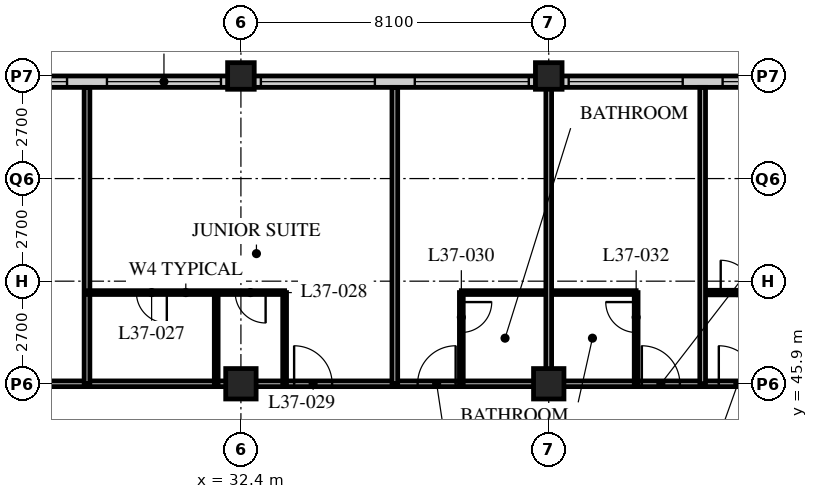
"""IFC4 building model, lengths in metres.
Left out: names, types, materials, properties, quantities, classifications, styles, units other than length and angle.
Written with IfcOpenShell. Run it as: python <this file> out.ifc"""

import sys

from ifc_helpers import new_model, si_unit, direction, frame, frame_2d, origin, origin_2d, place, context, subcontext, project, spatial, rectangle, hollow_rectangle, extrude, element, fill, save


model = new_model("IFC4")
c1 = context("Model", 3, precision=1e-05, world=origin(), true_north=direction((0.0, 1.0)))
c2 = subcontext(c1, "Body", "Model", "MODEL_VIEW")
j1 = project(units=[si_unit("LENGTHUNIT", "METRE"), si_unit("PLANEANGLEUNIT", "RADIAN")], contexts=[c1])
p1 = place(None, origin())
s1 = spatial("IfcSite", under=j1, at=p1, CompositionType="ELEMENT")
p2 = place(p1, origin())
s2 = spatial("IfcBuilding", under=s1, at=p2, CompositionType="ELEMENT")
p3 = place(p2, frame((0.0, 0.0, 144.2)))
s3 = spatial("IfcBuildingStorey", under=s2, at=p3, CompositionType="ELEMENT", Elevation=144.2)
p4 = place(p3, frame((32.4, 45.9, 0.0), z_axis=(0.0, 0.0, 1.0), x_axis=(1.0, 0.0, 0.0)))
e1 = element("IfcColumn", 1, at=p4, inside=s3, PredefinedType="COLUMN", context=c2, shape_type="SweptSolid", body=[
    extrude(hollow_rectangle(XDim=0.8, YDim=0.8, WallThickness=0.08, at=origin_2d()), origin(), (0.0, 0.0, 1.0), 3.4),
])
p5 = place(p3, frame((32.4, 54.0, 0.0), z_axis=(0.0, 0.0, 1.0), x_axis=(1.0, 0.0, 0.0)))
e2 = element("IfcColumn", 2, at=p5, inside=s3, PredefinedType="COLUMN", context=c2, shape_type="SweptSolid", body=[
    extrude(hollow_rectangle(XDim=0.7, YDim=0.7, WallThickness=0.07, at=origin_2d()), origin(), (0.0, 0.0, 1.0), 3.4),
])
p6 = place(p3, frame((40.5, 45.9, 0.0), z_axis=(0.0, 0.0, 1.0), x_axis=(1.0, 0.0, 0.0)))
e3 = element("IfcColumn", 3, at=p6, inside=s3, PredefinedType="COLUMN", context=c2, shape_type="SweptSolid", body=[
    extrude(hollow_rectangle(XDim=0.8, YDim=0.8, WallThickness=0.08, at=origin_2d()), origin(), (0.0, 0.0, 1.0), 3.4),
])
p7 = place(p3, frame((40.5, 54.0, 0.0), z_axis=(0.0, 0.0, 1.0), x_axis=(1.0, 0.0, 0.0)))
e4 = element("IfcColumn", 4, at=p7, inside=s3, PredefinedType="COLUMN", context=c2, shape_type="SweptSolid", body=[
    extrude(hollow_rectangle(XDim=0.7, YDim=0.7, WallThickness=0.07, at=origin_2d()), origin(), (0.0, 0.0, 1.0), 3.4),
])
p8 = place(p3, frame((48.3, 53.85, 0.0), z_axis=(0.0, 0.0, 1.0), x_axis=(-1.0, 0.0, 0.0)))
e5 = element("IfcWall", 5, at=p8, inside=s3, PredefinedType="SOLIDWALL", context=c2, shape_type="SweptSolid", body=[
    extrude(rectangle(XDim=40.2, YDim=0.3, at=frame_2d((20.1, 0.0))), origin(), (0.0, 0.0, 1.0), 3.19),
])
p9 = place(p8, frame((0.225, 0.0, 0.9)))
e6 = element("IfcOpeningElement", 6, at=p9, cuts=e5, PredefinedType="OPENING", context=c2, shape_type="SweptSolid", body=[
    extrude(rectangle(XDim=3.0, YDim=1.4, at=frame_2d((1.5, 0.7))), frame((0.0, 0.16, 0.0), z_axis=(0.0, -1.0, 0.0), x_axis=(1.0, 0.0, 0.0)), (0.0, 0.0, 1.0), 0.32),
])
p10 = place(p8, frame((4.275, 0.0, 0.9)))
e7 = element("IfcOpeningElement", 7, at=p10, cuts=e5, PredefinedType="OPENING", context=c2, shape_type="SweptSolid", body=[
    extrude(rectangle(XDim=3.0, YDim=1.4, at=frame_2d((1.5, 0.7))), frame((0.0, 0.16, 0.0), z_axis=(0.0, -1.0, 0.0), x_axis=(1.0, 0.0, 0.0)), (0.0, 0.0, 1.0), 0.32),
])
p11 = place(p8, frame((8.325, 0.0, 0.9)))
e8 = element("IfcOpeningElement", 8, at=p11, cuts=e5, PredefinedType="OPENING", context=c2, shape_type="SweptSolid", body=[
    extrude(rectangle(XDim=3.0, YDim=1.4, at=frame_2d((1.5, 0.7))), frame((0.0, 0.16, 0.0), z_axis=(0.0, -1.0, 0.0), x_axis=(1.0, 0.0, 0.0)), (0.0, 0.0, 1.0), 0.32),
])
p12 = place(p8, frame((12.375, 0.0, 0.9)))
e9 = element("IfcOpeningElement", 9, at=p12, cuts=e5, PredefinedType="OPENING", context=c2, shape_type="SweptSolid", body=[
    extrude(rectangle(XDim=3.0, YDim=1.4, at=frame_2d((1.5, 0.7))), frame((0.0, 0.16, 0.0), z_axis=(0.0, -1.0, 0.0), x_axis=(1.0, 0.0, 0.0)), (0.0, 0.0, 1.0), 0.32),
])
p13 = place(p8, frame((16.425, 0.0, 0.9)))
e10 = element("IfcOpeningElement", 10, at=p13, cuts=e5, PredefinedType="OPENING", context=c2, shape_type="SweptSolid", body=[
    extrude(rectangle(XDim=3.0, YDim=1.4, at=frame_2d((1.5, 0.7))), frame((0.0, 0.16, 0.0), z_axis=(0.0, -1.0, 0.0), x_axis=(1.0, 0.0, 0.0)), (0.0, 0.0, 1.0), 0.32),
])
p14 = place(p8, frame((20.475, 0.0, 0.9)))
e11 = element("IfcOpeningElement", 11, at=p14, cuts=e5, PredefinedType="OPENING", context=c2, shape_type="SweptSolid", body=[
    extrude(rectangle(XDim=3.0, YDim=1.4, at=frame_2d((1.5, 0.7))), frame((0.0, 0.16, 0.0), z_axis=(0.0, -1.0, 0.0), x_axis=(1.0, 0.0, 0.0)), (0.0, 0.0, 1.0), 0.32),
])
p15 = place(p8, frame((24.525, 0.0, 0.9)))
e12 = element("IfcOpeningElement", 12, at=p15, cuts=e5, PredefinedType="OPENING", context=c2, shape_type="SweptSolid", body=[
    extrude(rectangle(XDim=3.0, YDim=1.4, at=frame_2d((1.5, 0.7))), frame((0.0, 0.16, 0.0), z_axis=(0.0, -1.0, 0.0), x_axis=(1.0, 0.0, 0.0)), (0.0, 0.0, 1.0), 0.32),
])
p16 = place(p8, frame((28.575, 0.0, 0.9)))
e13 = element("IfcOpeningElement", 13, at=p16, cuts=e5, PredefinedType="OPENING", context=c2, shape_type="SweptSolid", body=[
    extrude(rectangle(XDim=3.0, YDim=1.4, at=frame_2d((1.5, 0.7))), frame((0.0, 0.16, 0.0), z_axis=(0.0, -1.0, 0.0), x_axis=(1.0, 0.0, 0.0)), (0.0, 0.0, 1.0), 0.32),
])
p17 = place(p8, frame((32.625, 0.0, 0.9)))
e14 = element("IfcOpeningElement", 14, at=p17, cuts=e5, PredefinedType="OPENING", context=c2, shape_type="SweptSolid", body=[
    extrude(rectangle(XDim=3.0, YDim=1.4, at=frame_2d((1.5, 0.7))), frame((0.0, 0.16, 0.0), z_axis=(0.0, -1.0, 0.0), x_axis=(1.0, 0.0, 0.0)), (0.0, 0.0, 1.0), 0.32),
])
p18 = place(p8, frame((36.675, 0.0, 0.9)))
e15 = element("IfcOpeningElement", 15, at=p18, cuts=e5, PredefinedType="OPENING", context=c2, shape_type="SweptSolid", body=[
    extrude(rectangle(XDim=3.0, YDim=1.4, at=frame_2d((1.5, 0.7))), frame((0.0, 0.16, 0.0), z_axis=(0.0, -1.0, 0.0), x_axis=(1.0, 0.0, 0.0)), (0.0, 0.0, 1.0), 0.32),
])
p19 = place(p3, frame((12.15, 45.9, 0.0), z_axis=(0.0, 0.0, 1.0), x_axis=(1.0, 0.0, 0.0)))
e16 = element("IfcWall", 16, at=p19, inside=s3, PredefinedType="PARTITIONING", context=c2, shape_type="SweptSolid", body=[
    extrude(rectangle(XDim=36.45, YDim=0.15, at=frame_2d((18.225, 0.0))), origin(), (0.0, 0.0, 1.0), 2.42),
])
p20 = place(p19, frame((9.225, 0.0, 0.0)))
e17 = element("IfcOpeningElement", 17, at=p20, cuts=e16, PredefinedType="OPENING", context=c2, shape_type="SweptSolid", body=[
    extrude(rectangle(XDim=1.8, YDim=2.4, at=frame_2d((0.9, 1.2))), frame((0.0, 0.085, 0.0), z_axis=(0.0, -1.0, 0.0), x_axis=(1.0, 0.0, 0.0)), (0.0, 0.0, 1.0), 0.17),
])
p21 = place(p19, frame((21.65, 0.0, 0.0)))
e18 = element("IfcOpeningElement", 18, at=p21, cuts=e16, PredefinedType="OPENING", context=c2, shape_type="SweptSolid", body=[
    extrude(rectangle(XDim=1.0, YDim=2.1, at=frame_2d((0.5, 1.05))), frame((0.0, 0.085, 0.0), z_axis=(0.0, -1.0, 0.0), x_axis=(1.0, 0.0, 0.0)), (0.0, 0.0, 1.0), 0.17),
])
p22 = place(p19, frame((24.9, 0.0, 0.0)))
e19 = element("IfcOpeningElement", 19, at=p22, cuts=e16, PredefinedType="OPENING", context=c2, shape_type="SweptSolid", body=[
    extrude(rectangle(XDim=1.0, YDim=2.1, at=frame_2d((0.5, 1.05))), frame((0.0, 0.085, 0.0), z_axis=(0.0, -1.0, 0.0), x_axis=(1.0, 0.0, 0.0)), (0.0, 0.0, 1.0), 0.17),
])
p23 = place(p19, frame((30.8, 0.0, 0.0)))
e20 = element("IfcOpeningElement", 20, at=p23, cuts=e16, PredefinedType="OPENING", context=c2, shape_type="SweptSolid", body=[
    extrude(rectangle(XDim=1.0, YDim=2.1, at=frame_2d((0.5, 1.05))), frame((0.0, 0.085, 0.0), z_axis=(0.0, -1.0, 0.0), x_axis=(1.0, 0.0, 0.0)), (0.0, 0.0, 1.0), 0.17),
])
p24 = place(p19, frame((32.825, 0.0, 0.0)))
e21 = element("IfcOpeningElement", 21, at=p24, cuts=e16, PredefinedType="OPENING", context=c2, shape_type="SweptSolid", body=[
    extrude(rectangle(XDim=1.0, YDim=2.1, at=frame_2d((0.5, 1.05))), frame((0.0, 0.085, 0.0), z_axis=(0.0, -1.0, 0.0), x_axis=(1.0, 0.0, 0.0)), (0.0, 0.0, 1.0), 0.17),
])
p25 = place(p19, frame((1.525, 0.0, 0.0)))
e22 = element("IfcOpeningElement", 22, at=p25, cuts=e16, PredefinedType="OPENING", context=c2, shape_type="SweptSolid", body=[
    extrude(rectangle(XDim=1.0, YDim=2.1, at=frame_2d((0.5, 1.05))), frame((0.0, 0.085, 0.0), z_axis=(0.0, -1.0, 0.0), x_axis=(1.0, 0.0, 0.0)), (0.0, 0.0, 1.0), 0.17),
])
p26 = place(p3, frame((28.35, 45.9, 0.0), z_axis=(0.0, 0.0, 1.0), x_axis=(0.0, 1.0, 0.0)))
e23 = element("IfcWall", 23, at=p26, inside=s3, PredefinedType="PARTITIONING", context=c2, shape_type="SweptSolid", body=[
    extrude(rectangle(XDim=7.8, YDim=0.15, at=frame_2d((3.9, 0.0))), origin(), (0.0, 0.0, 1.0), 3.19),
])
p27 = place(p3, frame((28.35, 48.3, 0.0), z_axis=(0.0, 0.0, 1.0), x_axis=(1.0, 0.0, 0.0)))
e24 = element("IfcWall", 24, at=p27, inside=s3, PredefinedType="PARTITIONING", context=c2, shape_type="SweptSolid", body=[
    extrude(rectangle(XDim=5.2, YDim=0.1, at=frame_2d((2.6, 0.0))), origin(), (0.0, 0.0, 1.0), 3.19),
])
p28 = place(p27, frame((1.3, 0.0, 0.0)))
e25 = element("IfcOpeningElement", 25, at=p28, cuts=e24, PredefinedType="OPENING", context=c2, shape_type="SweptSolid", body=[
    extrude(rectangle(XDim=0.8, YDim=2.1, at=frame_2d((0.4, 1.05))), frame((0.0, 0.06, 0.0), z_axis=(0.0, -1.0, 0.0), x_axis=(1.0, 0.0, 0.0)), (0.0, 0.0, 1.0), 0.12),
])
p29 = place(p27, frame((3.9, 0.0, 0.0)))
e26 = element("IfcOpeningElement", 26, at=p29, cuts=e24, PredefinedType="OPENING", context=c2, shape_type="SweptSolid", body=[
    extrude(rectangle(XDim=0.8, YDim=2.1, at=frame_2d((0.4, 1.05))), frame((0.0, 0.06, 0.0), z_axis=(0.0, -1.0, 0.0), x_axis=(1.0, 0.0, 0.0)), (0.0, 0.0, 1.0), 0.12),
])
for number, where, z_axis, x_axis in (
    (27, (31.75, 45.9, 0.0), (0.0, 0.0, 1.0), (0.0, 1.0, 0.0)),
    (28, (33.55, 45.9, 0.0), (0.0, 0.0, 1.0), (0.0, 1.0, 0.0)),
):
    element("IfcWall", number, at=place(p3, frame(where, z_axis=z_axis, x_axis=x_axis)), inside=s3, PredefinedType="PARTITIONING", context=c2, shape_type="SweptSolid", body=[
        extrude(rectangle(XDim=2.4, YDim=0.1, at=frame_2d((1.2, 0.0))), origin(), (0.0, 0.0, 1.0), 3.19),
    ])
p30 = place(p3, frame((36.45, 45.9, 0.0), z_axis=(0.0, 0.0, 1.0), x_axis=(0.0, 1.0, 0.0)))
e29 = element("IfcWall", 29, at=p30, inside=s3, PredefinedType="PARTITIONING", context=c2, shape_type="SweptSolid", body=[
    extrude(rectangle(XDim=7.8, YDim=0.15, at=frame_2d((3.9, 0.0))), origin(), (0.0, 0.0, 1.0), 3.19),
])
p31 = place(p3, frame((38.2, 48.3, 0.0), z_axis=(0.0, 0.0, 1.0), x_axis=(1.0, 0.0, 0.0)))
e30 = element("IfcWall", 30, at=p31, inside=s3, PredefinedType="PARTITIONING", context=c2, shape_type="SweptSolid", body=[
    extrude(rectangle(XDim=4.6, YDim=0.1, at=frame_2d((2.3, 0.0))), origin(), (0.0, 0.0, 1.0), 3.19),
])
p32 = place(p3, frame((38.2, 45.9, 0.0), z_axis=(0.0, 0.0, 1.0), x_axis=(0.0, 1.0, 0.0)))
e31 = element("IfcWall", 31, at=p32, inside=s3, PredefinedType="PARTITIONING", context=c2, shape_type="SweptSolid", body=[
    extrude(rectangle(XDim=2.4, YDim=0.1, at=frame_2d((1.2, 0.0))), origin(), (0.0, 0.0, 1.0), 3.19),
])
p33 = place(p32, frame((1.35, 0.0, 0.0)))
e32 = element("IfcOpeningElement", 32, at=p33, cuts=e31, PredefinedType="OPENING", context=c2, shape_type="SweptSolid", body=[
    extrude(rectangle(XDim=0.8, YDim=2.1, at=frame_2d((0.4, 1.05))), frame((0.0, 0.06, 0.0), z_axis=(0.0, -1.0, 0.0), x_axis=(1.0, 0.0, 0.0)), (0.0, 0.0, 1.0), 0.12),
])
p34 = place(p3, frame((40.5, 45.9, 0.0), z_axis=(0.0, 0.0, 1.0), x_axis=(0.0, 1.0, 0.0)))
e33 = element("IfcWall", 33, at=p34, inside=s3, PredefinedType="PARTITIONING", context=c2, shape_type="SweptSolid", body=[
    extrude(rectangle(XDim=7.8, YDim=0.15, at=frame_2d((3.9, 0.0))), origin(), (0.0, 0.0, 1.0), 2.42),
])
p35 = place(p3, frame((42.8, 45.9, 0.0), z_axis=(0.0, 0.0, 1.0), x_axis=(0.0, 1.0, 0.0)))
e34 = element("IfcWall", 34, at=p35, inside=s3, PredefinedType="PARTITIONING", context=c2, shape_type="SweptSolid", body=[
    extrude(rectangle(XDim=2.4, YDim=0.1, at=frame_2d((1.2, 0.0))), origin(), (0.0, 0.0, 1.0), 3.19),
])
p36 = place(p35, frame((1.35, 0.0, 0.0)))
e35 = element("IfcOpeningElement", 35, at=p36, cuts=e34, PredefinedType="OPENING", context=c2, shape_type="SweptSolid", body=[
    extrude(rectangle(XDim=0.8, YDim=2.1, at=frame_2d((0.4, 1.05))), frame((0.0, 0.06, 0.0), z_axis=(0.0, -1.0, 0.0), x_axis=(1.0, 0.0, 0.0)), (0.0, 0.0, 1.0), 0.12),
])
p37 = place(p3, frame((44.55, 48.3, 0.0), z_axis=(0.0, 0.0, 1.0), x_axis=(1.0, 0.0, 0.0)))
e36 = element("IfcWall", 36, at=p37, inside=s3, PredefinedType="PARTITIONING", context=c2, shape_type="SweptSolid", body=[
    extrude(rectangle(XDim=4.05, YDim=0.12, at=frame_2d((2.025, 0.0))), origin(), (0.0, 0.0, 1.0), 3.19),
])
p38 = place(p37, frame((0.475, 0.0, 0.0)))
e37 = element("IfcOpeningElement", 37, at=p38, cuts=e36, PredefinedType="OPENING", context=c2, shape_type="SweptSolid", body=[
    extrude(rectangle(XDim=0.85, YDim=2.1, at=frame_2d((0.425, 1.05))), frame((0.0, 0.07, 0.0), z_axis=(0.0, -1.0, 0.0), x_axis=(1.0, 0.0, 0.0)), (0.0, 0.0, 1.0), 0.14),
])
p39 = place(p3, frame((44.55, 45.9, 0.0), z_axis=(0.0, 0.0, 1.0), x_axis=(0.0, 1.0, 0.0)))
e38 = element("IfcWall", 38, at=p39, inside=s3, PredefinedType="PARTITIONING", context=c2, shape_type="SweptSolid", body=[
    extrude(rectangle(XDim=7.8, YDim=0.15, at=frame_2d((3.9, 0.0))), origin(), (0.0, 0.0, 1.0), 3.19),
])
p40 = place(p9, origin())
e39 = element("IfcWindow", 39, at=p40, inside=s3, PartitioningType="SINGLE_PANEL", PredefinedType="WINDOW", context=c2, shape_type="SweptSolid", body=[
    extrude(rectangle(XDim=3.0, YDim=1.4, at=frame_2d((1.5, 0.7))), frame((0.0, 0.03, 0.0), z_axis=(0.0, -1.0, 0.0), x_axis=(1.0, 0.0, 0.0)), (0.0, 0.0, 1.0), 0.06),
])
fill(e6, e39)
p41 = place(p10, origin())
e40 = element("IfcWindow", 40, at=p41, inside=s3, PartitioningType="SINGLE_PANEL", PredefinedType="WINDOW", context=c2, shape_type="SweptSolid", body=[
    extrude(rectangle(XDim=3.0, YDim=1.4, at=frame_2d((1.5, 0.7))), frame((0.0, 0.03, 0.0), z_axis=(0.0, -1.0, 0.0), x_axis=(1.0, 0.0, 0.0)), (0.0, 0.0, 1.0), 0.06),
])
fill(e7, e40)
p42 = place(p11, origin())
e41 = element("IfcWindow", 41, at=p42, inside=s3, PartitioningType="SINGLE_PANEL", PredefinedType="WINDOW", context=c2, shape_type="SweptSolid", body=[
    extrude(rectangle(XDim=3.0, YDim=1.4, at=frame_2d((1.5, 0.7))), frame((0.0, 0.03, 0.0), z_axis=(0.0, -1.0, 0.0), x_axis=(1.0, 0.0, 0.0)), (0.0, 0.0, 1.0), 0.06),
])
fill(e8, e41)
p43 = place(p12, origin())
e42 = element("IfcWindow", 42, at=p43, inside=s3, PartitioningType="SINGLE_PANEL", PredefinedType="WINDOW", context=c2, shape_type="SweptSolid", body=[
    extrude(rectangle(XDim=3.0, YDim=1.4, at=frame_2d((1.5, 0.7))), frame((0.0, 0.03, 0.0), z_axis=(0.0, -1.0, 0.0), x_axis=(1.0, 0.0, 0.0)), (0.0, 0.0, 1.0), 0.06),
])
fill(e9, e42)
p44 = place(p13, origin())
e43 = element("IfcWindow", 43, at=p44, inside=s3, PartitioningType="SINGLE_PANEL", PredefinedType="WINDOW", context=c2, shape_type="SweptSolid", body=[
    extrude(rectangle(XDim=3.0, YDim=1.4, at=frame_2d((1.5, 0.7))), frame((0.0, 0.03, 0.0), z_axis=(0.0, -1.0, 0.0), x_axis=(1.0, 0.0, 0.0)), (0.0, 0.0, 1.0), 0.06),
])
fill(e10, e43)
p45 = place(p14, origin())
e44 = element("IfcWindow", 44, at=p45, inside=s3, PartitioningType="SINGLE_PANEL", PredefinedType="WINDOW", context=c2, shape_type="SweptSolid", body=[
    extrude(rectangle(XDim=3.0, YDim=1.4, at=frame_2d((1.5, 0.7))), frame((0.0, 0.03, 0.0), z_axis=(0.0, -1.0, 0.0), x_axis=(1.0, 0.0, 0.0)), (0.0, 0.0, 1.0), 0.06),
])
fill(e11, e44)
p46 = place(p28, origin())
e45 = element("IfcDoor", 45, at=p46, inside=s3, OperationType="SINGLE_SWING_LEFT", PredefinedType="DOOR", context=c2, shape_type="SweptSolid", body=[
    extrude(rectangle(XDim=0.8, YDim=2.1, at=frame_2d((0.4, 1.05))), frame((0.0, 0.025, 0.0), z_axis=(0.0, -1.0, 0.0), x_axis=(1.0, 0.0, 0.0)), (0.0, 0.0, 1.0), 0.05),
])
fill(e25, e45)
p47 = place(p29, origin())
e46 = element("IfcDoor", 46, at=p47, inside=s3, OperationType="SINGLE_SWING_LEFT", PredefinedType="DOOR", context=c2, shape_type="SweptSolid", body=[
    extrude(rectangle(XDim=0.8, YDim=2.1, at=frame_2d((0.4, 1.05))), frame((0.0, 0.025, 0.0), z_axis=(0.0, -1.0, 0.0), x_axis=(1.0, 0.0, 0.0)), (0.0, 0.0, 1.0), 0.05),
])
fill(e26, e46)
p48 = place(p21, origin())
e47 = element("IfcDoor", 47, at=p48, inside=s3, OperationType="SINGLE_SWING_LEFT", PredefinedType="DOOR", context=c2, shape_type="SweptSolid", body=[
    extrude(rectangle(XDim=1.0, YDim=2.1, at=frame_2d((0.5, 1.05))), frame((0.0, 0.025, 0.0), z_axis=(0.0, -1.0, 0.0), x_axis=(1.0, 0.0, 0.0)), (0.0, 0.0, 1.0), 0.05),
])
fill(e18, e47)
p49 = place(p33, origin())
e48 = element("IfcDoor", 48, at=p49, inside=s3, OperationType="SINGLE_SWING_LEFT", PredefinedType="DOOR", context=c2, shape_type="SweptSolid", body=[
    extrude(rectangle(XDim=0.8, YDim=2.1, at=frame_2d((0.4, 1.05))), frame((0.0, 0.025, 0.0), z_axis=(0.0, -1.0, 0.0), x_axis=(1.0, 0.0, 0.0)), (0.0, 0.0, 1.0), 0.05),
])
fill(e32, e48)
p50 = place(p22, origin())
e49 = element("IfcDoor", 49, at=p50, inside=s3, OperationType="SINGLE_SWING_RIGHT", PredefinedType="DOOR", context=c2, shape_type="SweptSolid", body=[
    extrude(rectangle(XDim=1.0, YDim=2.1, at=frame_2d((0.5, 1.05))), frame((0.0, 0.025, 0.0), z_axis=(0.0, -1.0, 0.0), x_axis=(1.0, 0.0, 0.0)), (0.0, 0.0, 1.0), 0.05),
])
fill(e19, e49)
p51 = place(p36, origin())
e50 = element("IfcDoor", 50, at=p51, inside=s3, OperationType="SINGLE_SWING_RIGHT", PredefinedType="DOOR", context=c2, shape_type="SweptSolid", body=[
    extrude(rectangle(XDim=0.8, YDim=2.1, at=frame_2d((0.4, 1.05))), frame((0.0, 0.025, 0.0), z_axis=(0.0, -1.0, 0.0), x_axis=(1.0, 0.0, 0.0)), (0.0, 0.0, 1.0), 0.05),
])
fill(e35, e50)
p52 = place(p23, origin())
e51 = element("IfcDoor", 51, at=p52, inside=s3, OperationType="SINGLE_SWING_LEFT", PredefinedType="DOOR", context=c2, shape_type="SweptSolid", body=[
    extrude(rectangle(XDim=1.0, YDim=2.1, at=frame_2d((0.5, 1.05))), frame((0.0, 0.025, 0.0), z_axis=(0.0, -1.0, 0.0), x_axis=(1.0, 0.0, 0.0)), (0.0, 0.0, 1.0), 0.05),
])
fill(e20, e51)
p53 = place(p24, origin())
e52 = element("IfcDoor", 52, at=p53, inside=s3, OperationType="SINGLE_SWING_LEFT", PredefinedType="DOOR", context=c2, shape_type="SweptSolid", body=[
    extrude(rectangle(XDim=1.0, YDim=2.1, at=frame_2d((0.5, 1.05))), frame((0.0, 0.025, 0.0), z_axis=(0.0, -1.0, 0.0), x_axis=(1.0, 0.0, 0.0)), (0.0, 0.0, 1.0), 0.05),
])
fill(e21, e52)
p54 = place(p38, origin())
e53 = element("IfcDoor", 53, at=p54, inside=s3, OperationType="SINGLE_SWING_LEFT", PredefinedType="DOOR", context=c2, shape_type="SweptSolid", body=[
    extrude(rectangle(XDim=0.85, YDim=2.1, at=frame_2d((0.425, 1.05))), frame((0.0, 0.025, 0.0), z_axis=(0.0, -1.0, 0.0), x_axis=(1.0, 0.0, 0.0)), (0.0, 0.0, 1.0), 0.05),
])
fill(e37, e53)
save(model, sys.argv[1])
